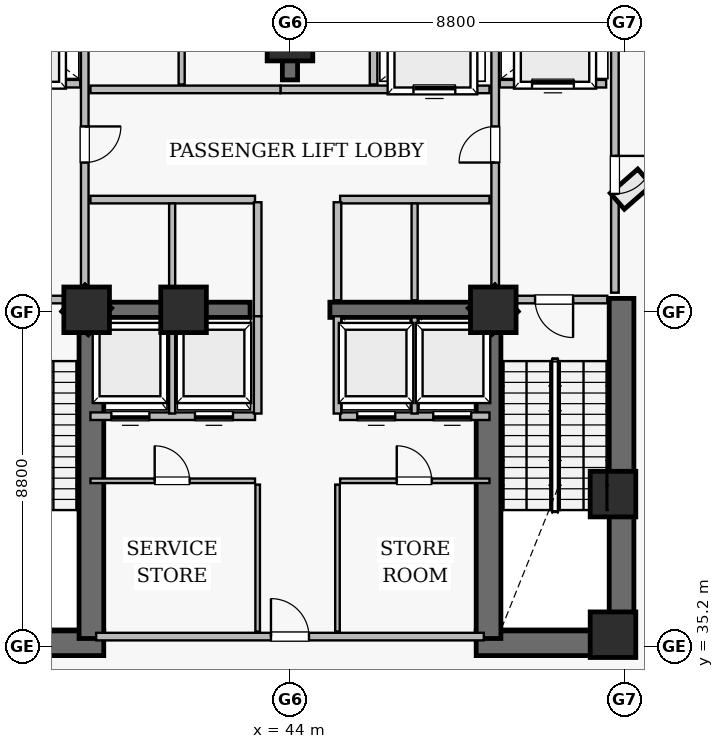
"""IFC4 building model, lengths in metres.
Left out: names, types, materials, properties, quantities, classifications, styles, units other than length and angle.
Written with IfcOpenShell. Run it as: python <this file> out.ifc"""

import sys

from ifc_helpers import new_model, si_unit, direction, frame, frame_2d, origin, origin_2d, place, context, subcontext, project, spatial, rectangle, extrude, element, fill, save


model = new_model("IFC4")
c1 = context("Model", 3, precision=1e-05, world=origin(), true_north=direction((0.0, 1.0)))
c2 = subcontext(c1, "Body", "Model", "MODEL_VIEW")
j1 = project(units=[si_unit("LENGTHUNIT", "METRE"), si_unit("PLANEANGLEUNIT", "RADIAN")], contexts=[c1])
p1 = place(None, origin())
s1 = spatial("IfcSite", under=j1, at=p1, CompositionType="ELEMENT")
p2 = place(p1, origin())
s2 = spatial("IfcBuilding", under=s1, at=p2, CompositionType="ELEMENT")
p3 = place(p2, frame((0.0, 0.0, 90.4)))
s3 = spatial("IfcBuildingStorey", under=s2, at=p3, CompositionType="ELEMENT", Elevation=90.4)
for number, where, z_axis, x_axis in (
    (1, (34.95, 35.275, 0.0), (0.0, 0.0, 1.0), (1.0, 0.0, 0.0)),
    (2, (48.9, 35.275, 0.0), (0.0, 0.0, 1.0), (1.0, 0.0, 0.0)),
):
    element("IfcWall", number, at=place(p3, frame(where, z_axis=z_axis, x_axis=x_axis)), inside=s3, PredefinedType="SHEAR", context=c2, shape_type="SweptSolid", body=[
        extrude(rectangle(XDim=4.15, YDim=0.65, at=frame_2d((2.075, 0.0))), origin(), (0.0, 0.0, 1.0), 5.1),
    ])
p4 = place(p3, frame((52.725, 34.95, 0.0), z_axis=(0.0, 0.0, 1.0), x_axis=(0.0, 1.0, 0.0)))
e3 = element("IfcWall", 3, at=p4, inside=s3, PredefinedType="SHEAR", context=c2, shape_type="SweptSolid", body=[
    extrude(rectangle(XDim=9.4, YDim=0.65, at=frame_2d((4.7, 0.0))), origin(), (0.0, 0.0, 1.0), 5.1),
])
for number, where, z_axis, x_axis in (
    (4, (38.775, 35.4, 0.0), (0.0, 0.0, 1.0), (0.0, 1.0, 0.0)),
    (5, (49.225, 35.4, 0.0), (0.0, 0.0, 1.0), (0.0, 1.0, 0.0)),
):
    element("IfcWall", number, at=place(p3, frame(where, z_axis=z_axis, x_axis=x_axis)), inside=s3, PredefinedType="SHEAR", context=c2, shape_type="SweptSolid", body=[
        extrude(rectangle(XDim=8.95, YDim=0.65, at=frame_2d((4.475, 0.0))), origin(), (0.0, 0.0, 1.0), 5.1),
    ])
p5 = place(p3, frame((44.0, 50.1, 0.0), z_axis=(0.0, 0.0, 1.0), x_axis=(0.0, 1.0, 0.0)))
e6 = element("IfcWall", 6, at=p5, inside=s3, PredefinedType="SHEAR", context=c2, shape_type="SweptSolid", body=[
    extrude(rectangle(XDim=2.1, YDim=0.4, at=frame_2d((1.05, 0.0))), origin(), (0.0, 0.0, 1.0), 5.1),
])
for number, where, z_axis, x_axis in (
    (7, (38.75, 44.05, 0.0), (0.0, 0.0, 1.0), (1.0, 0.0, 0.0)),
    (8, (45.05, 44.05, 0.0), (0.0, 0.0, 1.0), (1.0, 0.0, 0.0)),
):
    element("IfcWall", number, at=place(p3, frame(where, z_axis=z_axis, x_axis=x_axis)), inside=s3, PredefinedType="SHEAR", context=c2, shape_type="SweptSolid", body=[
        extrude(rectangle(XDim=4.2, YDim=0.4, at=frame_2d((2.1, 0.0))), origin(), (0.0, 0.0, 1.0), 5.1),
    ])
for number, where, z_axis, x_axis in (
    (9, (38.65, 44.05, 0.0), (0.0, 0.0, 1.0), (1.0, 0.0, 0.0)),
    (10, (52.5, 35.5, 0.0), (0.0, 0.0, 1.0), (1.0, 0.0, 0.0)),
    (11, (52.5, 39.2, 0.0), (0.0, 0.0, 1.0), (1.0, 0.0, 0.0)),
    (12, (49.35, 44.05, 0.0), (0.0, 0.0, 1.0), (1.0, 0.0, 0.0)),
    (13, (44.0, 51.2, 0.0), (0.0, 0.0, 1.0), (1.0, 0.0, 0.0)),
    (14, (41.2, 44.05, 0.0), (0.0, 0.0, 1.0), (1.0, 0.0, 0.0)),
):
    element("IfcColumn", number, at=place(p3, frame(where, z_axis=z_axis, x_axis=x_axis)), inside=s3, PredefinedType="COLUMN", context=c2, shape_type="SweptSolid", body=[
        extrude(rectangle(XDim=1.2, YDim=1.2, at=origin_2d()), origin(), (0.0, 0.0, 1.0), 5.4),
    ])
p6 = place(p3, frame((38.9, 35.45, 0.0), z_axis=(0.0, 0.0, 1.0), x_axis=(1.0, 0.0, 0.0)))
e15 = element("IfcWall", 15, at=p6, inside=s3, PredefinedType="SOLIDWALL", context=c2, shape_type="SweptSolid", body=[
    extrude(rectangle(XDim=10.2, YDim=0.2, at=frame_2d((5.1, 0.0))), origin(), (0.0, 0.0, 1.0), 5.1),
])
p7 = place(p6, frame((4.6, 0.0, 0.0)))
e16 = element("IfcOpeningElement", 16, at=p7, cuts=e15, PredefinedType="OPENING", context=c2, shape_type="SweptSolid", body=[
    extrude(rectangle(XDim=1.0, YDim=2.15, at=frame_2d((0.5, 1.075))), frame((0.0, 0.11, 0.0), z_axis=(0.0, -1.0, 0.0), x_axis=(1.0, 0.0, 0.0)), (0.0, 0.0, 1.0), 0.22),
])
p8 = place(p3, frame((52.55, 44.5, 0.0), z_axis=(0.0, 0.0, 1.0), x_axis=(0.0, 1.0, 0.0)))
e17 = element("IfcWall", 17, at=p8, inside=s3, PredefinedType="SOLIDWALL", context=c2, shape_type="SweptSolid", body=[
    extrude(rectangle(XDim=7.92, YDim=0.2, at=frame_2d((3.96, 0.0))), origin(), (0.0, 0.0, 1.0), 5.1),
])
p9 = place(p8, frame((2.6, 0.0, 0.0)))
e18 = element("IfcOpeningElement", 18, at=p9, cuts=e17, PredefinedType="OPENING", context=c2, shape_type="SweptSolid", body=[
    extrude(rectangle(XDim=1.0, YDim=2.15, at=frame_2d((0.5, 1.075))), frame((0.0, 0.11, 0.0), z_axis=(0.0, -1.0, 0.0), x_axis=(1.0, 0.0, 0.0)), (0.0, 0.0, 1.0), 0.22),
])
p10 = place(p3, frame((38.6, 44.5, 0.0), z_axis=(0.0, 0.0, 1.0), x_axis=(0.0, 1.0, 0.0)))
e19 = element("IfcWall", 19, at=p10, inside=s3, PredefinedType="SOLIDWALL", context=c2, shape_type="SweptSolid", body=[
    extrude(rectangle(XDim=7.92, YDim=0.2, at=frame_2d((3.96, 0.0))), origin(), (0.0, 0.0, 1.0), 5.1),
])
p11 = place(p10, frame((3.425, 0.0, 0.0)))
e20 = element("IfcOpeningElement", 20, at=p11, cuts=e19, PredefinedType="OPENING", context=c2, shape_type="SweptSolid", body=[
    extrude(rectangle(XDim=0.95, YDim=2.15, at=frame_2d((0.475, 1.075))), frame((0.0, 0.11, 0.0), z_axis=(0.0, -1.0, 0.0), x_axis=(1.0, 0.0, 0.0)), (0.0, 0.0, 1.0), 0.22),
])
p12 = place(p3, frame((49.4, 44.5, 0.0), z_axis=(0.0, 0.0, 1.0), x_axis=(0.0, 1.0, 0.0)))
e21 = element("IfcWall", 21, at=p12, inside=s3, PredefinedType="SOLIDWALL", context=c2, shape_type="SweptSolid", body=[
    extrude(rectangle(XDim=7.92, YDim=0.2, at=frame_2d((3.96, 0.0))), origin(), (0.0, 0.0, 1.0), 4.188),
])
p13 = place(p12, frame((3.425, 0.0, 0.0)))
e22 = element("IfcOpeningElement", 22, at=p13, cuts=e21, PredefinedType="OPENING", context=c2, shape_type="SweptSolid", body=[
    extrude(rectangle(XDim=0.95, YDim=2.15, at=frame_2d((0.475, 1.075))), frame((0.0, 0.11, 0.0), z_axis=(0.0, -1.0, 0.0), x_axis=(1.0, 0.0, 0.0)), (0.0, 0.0, 1.0), 0.22),
])
p14 = place(p3, frame((43.75, 49.85, 0.0), z_axis=(0.0, 0.0, 1.0), x_axis=(1.0, 0.0, 0.0)))
e23 = element("IfcWall", 23, at=p14, inside=s3, PredefinedType="SOLIDWALL", context=c2, shape_type="SweptSolid", body=[
    extrude(rectangle(XDim=5.5, YDim=0.2, at=frame_2d((2.75, 0.0))), origin(), (0.0, 0.0, 1.0), 4.188),
])
p15 = place(p14, frame((3.5, 0.0, 0.0)))
e24 = element("IfcOpeningElement", 24, at=p15, cuts=e23, PredefinedType="OPENING", context=c2, shape_type="SweptSolid", body=[
    extrude(rectangle(XDim=1.1, YDim=2.15, at=frame_2d((0.55, 1.075))), frame((0.0, 0.11, 0.0), z_axis=(0.0, -1.0, 0.0), x_axis=(1.0, 0.0, 0.0)), (0.0, 0.0, 1.0), 0.22),
])
p16 = place(p3, frame((38.75, 41.25, 0.0), z_axis=(0.0, 0.0, 1.0), x_axis=(1.0, 0.0, 0.0)))
e25 = element("IfcWall", 25, at=p16, inside=s3, PredefinedType="SOLIDWALL", context=c2, shape_type="SweptSolid", body=[
    extrude(rectangle(XDim=4.33, YDim=0.2, at=frame_2d((2.165, 0.0))), origin(), (0.0, 0.0, 1.0), 5.1),
])
p17 = place(p16, frame((0.55, 0.0, 0.0)))
e26 = element("IfcOpeningElement", 26, at=p17, cuts=e25, PredefinedType="OPENING", context=c2, shape_type="SweptSolid", body=[
    extrude(rectangle(XDim=1.0, YDim=2.15, at=frame_2d((0.5, 1.075))), frame((0.0, 0.11, 0.0), z_axis=(0.0, -1.0, 0.0), x_axis=(1.0, 0.0, 0.0)), (0.0, 0.0, 1.0), 0.22),
])
p18 = place(p16, frame((2.75, 0.0, 0.0)))
e27 = element("IfcOpeningElement", 27, at=p18, cuts=e25, PredefinedType="OPENING", context=c2, shape_type="SweptSolid", body=[
    extrude(rectangle(XDim=1.0, YDim=2.15, at=frame_2d((0.5, 1.075))), frame((0.0, 0.11, 0.0), z_axis=(0.0, -1.0, 0.0), x_axis=(1.0, 0.0, 0.0)), (0.0, 0.0, 1.0), 0.22),
])
p19 = place(p3, frame((38.75, 39.55, 0.0), z_axis=(0.0, 0.0, 1.0), x_axis=(1.0, 0.0, 0.0)))
e28 = element("IfcWall", 28, at=p19, inside=s3, PredefinedType="PARTITIONING", context=c2, shape_type="SweptSolid", body=[
    extrude(rectangle(XDim=4.33, YDim=0.12, at=frame_2d((2.165, 0.0))), origin(), (0.0, 0.0, 1.0), 5.1),
])
p20 = place(p19, frame((1.69, 0.0, 0.0)))
e29 = element("IfcOpeningElement", 29, at=p20, cuts=e28, PredefinedType="OPENING", context=c2, shape_type="SweptSolid", body=[
    extrude(rectangle(XDim=0.92, YDim=2.1, at=frame_2d((0.46, 1.05))), frame((0.0, 0.07, 0.0), z_axis=(0.0, -1.0, 0.0), x_axis=(1.0, 0.0, 0.0)), (0.0, 0.0, 1.0), 0.14),
])
p21 = place(p3, frame((45.32, 41.25, 0.0), z_axis=(0.0, 0.0, 1.0), x_axis=(1.0, 0.0, 0.0)))
e30 = element("IfcWall", 30, at=p21, inside=s3, PredefinedType="SOLIDWALL", context=c2, shape_type="SweptSolid", body=[
    extrude(rectangle(XDim=3.93, YDim=0.2, at=frame_2d((1.965, 0.0))), origin(), (0.0, 0.0, 1.0), 5.1),
])
p22 = place(p21, frame((0.45, 0.0, 0.0)))
e31 = element("IfcOpeningElement", 31, at=p22, cuts=e30, PredefinedType="OPENING", context=c2, shape_type="SweptSolid", body=[
    extrude(rectangle(XDim=1.0, YDim=2.15, at=frame_2d((0.5, 1.075))), frame((0.0, 0.11, 0.0), z_axis=(0.0, -1.0, 0.0), x_axis=(1.0, 0.0, 0.0)), (0.0, 0.0, 1.0), 0.22),
])
p23 = place(p21, frame((2.45, 0.0, 0.0)))
e32 = element("IfcOpeningElement", 32, at=p23, cuts=e30, PredefinedType="OPENING", context=c2, shape_type="SweptSolid", body=[
    extrude(rectangle(XDim=1.0, YDim=2.15, at=frame_2d((0.5, 1.075))), frame((0.0, 0.11, 0.0), z_axis=(0.0, -1.0, 0.0), x_axis=(1.0, 0.0, 0.0)), (0.0, 0.0, 1.0), 0.22),
])
p24 = place(p3, frame((45.32, 39.55, 0.0), z_axis=(0.0, 0.0, 1.0), x_axis=(1.0, 0.0, 0.0)))
e33 = element("IfcWall", 33, at=p24, inside=s3, PredefinedType="PARTITIONING", context=c2, shape_type="SweptSolid", body=[
    extrude(rectangle(XDim=3.93, YDim=0.12, at=frame_2d((1.965, 0.0))), origin(), (0.0, 0.0, 1.0), 5.1),
])
p25 = place(p24, frame((1.49, 0.0, 0.0)))
e34 = element("IfcOpeningElement", 34, at=p25, cuts=e33, PredefinedType="OPENING", context=c2, shape_type="SweptSolid", body=[
    extrude(rectangle(XDim=0.92, YDim=2.1, at=frame_2d((0.46, 1.05))), frame((0.0, 0.07, 0.0), z_axis=(0.0, -1.0, 0.0), x_axis=(1.0, 0.0, 0.0)), (0.0, 0.0, 1.0), 0.14),
])
p26 = place(p3, frame((35.65, 44.32, 0.0), z_axis=(0.0, 0.0, 1.0), x_axis=(1.0, 0.0, 0.0)))
e35 = element("IfcWall", 35, at=p26, inside=s3, PredefinedType="SOLIDWALL", context=c2, shape_type="SweptSolid", body=[
    extrude(rectangle(XDim=2.8, YDim=0.2, at=frame_2d((1.4, 0.0))), origin(), (0.0, 0.0, 1.0), 5.1),
])
p27 = place(p26, frame((0.9, 0.0, 0.0)))
e36 = element("IfcOpeningElement", 36, at=p27, cuts=e35, PredefinedType="OPENING", context=c2, shape_type="SweptSolid", body=[
    extrude(rectangle(XDim=1.0, YDim=2.15, at=frame_2d((0.5, 1.075))), frame((0.0, 0.11, 0.0), z_axis=(0.0, -1.0, 0.0), x_axis=(1.0, 0.0, 0.0)), (0.0, 0.0, 1.0), 0.22),
])
p28 = place(p3, frame((49.55, 44.32, 0.0), z_axis=(0.0, 0.0, 1.0), x_axis=(1.0, 0.0, 0.0)))
e37 = element("IfcWall", 37, at=p28, inside=s3, PredefinedType="SOLIDWALL", context=c2, shape_type="SweptSolid", body=[
    extrude(rectangle(XDim=2.8, YDim=0.2, at=frame_2d((1.4, 0.0))), origin(), (0.0, 0.0, 1.0), 4.188),
])
p29 = place(p28, frame((0.9, 0.0, 0.0)))
e38 = element("IfcOpeningElement", 38, at=p29, cuts=e37, PredefinedType="OPENING", context=c2, shape_type="SweptSolid", body=[
    extrude(rectangle(XDim=1.0, YDim=2.15, at=frame_2d((0.5, 1.075))), frame((0.0, 0.11, 0.0), z_axis=(0.0, -1.0, 0.0), x_axis=(1.0, 0.0, 0.0)), (0.0, 0.0, 1.0), 0.22),
])
p30 = place(p3, frame((35.68, 50.0, 0.0), z_axis=(0.0, 0.0, 1.0), x_axis=(1.0, 0.0, 0.0)))
e39 = element("IfcWall", 39, at=p30, inside=s3, PredefinedType="SOLIDWALL", context=c2, shape_type="SweptSolid", body=[
    extrude(rectangle(XDim=2.8, YDim=0.2, at=frame_2d((1.4, 0.0))), origin(), (0.0, 0.0, 1.0), 5.1),
])
p31 = place(p30, frame((0.85, 0.0, 0.0)))
e40 = element("IfcOpeningElement", 40, at=p31, cuts=e39, PredefinedType="OPENING", context=c2, shape_type="SweptSolid", body=[
    extrude(rectangle(XDim=1.1, YDim=2.15, at=frame_2d((0.55, 1.075))), frame((0.0, 0.11, 0.0), z_axis=(0.0, -1.0, 0.0), x_axis=(1.0, 0.0, 0.0)), (0.0, 0.0, 1.0), 0.22),
])
p32 = place(p3, frame((49.52, 50.0, 0.0), z_axis=(0.0, 0.0, 1.0), x_axis=(1.0, 0.0, 0.0)))
e41 = element("IfcWall", 41, at=p32, inside=s3, PredefinedType="SOLIDWALL", context=c2, shape_type="SweptSolid", body=[
    extrude(rectangle(XDim=2.8, YDim=0.2, at=frame_2d((1.4, 0.0))), origin(), (0.0, 0.0, 1.0), 5.1),
])
p33 = place(p32, frame((0.85, 0.0, 0.0)))
e42 = element("IfcOpeningElement", 42, at=p33, cuts=e41, PredefinedType="OPENING", context=c2, shape_type="SweptSolid", body=[
    extrude(rectangle(XDim=1.1, YDim=2.15, at=frame_2d((0.55, 1.075))), frame((0.0, 0.11, 0.0), z_axis=(0.0, -1.0, 0.0), x_axis=(1.0, 0.0, 0.0)), (0.0, 0.0, 1.0), 0.22),
])
p34 = place(p3, frame((38.75, 49.85, 0.0), z_axis=(0.0, 0.0, 1.0), x_axis=(1.0, 0.0, 0.0)))
e43 = element("IfcWall", 43, at=p34, inside=s3, PredefinedType="SOLIDWALL", context=c2, shape_type="SweptSolid", body=[
    extrude(rectangle(XDim=5.0, YDim=0.2, at=frame_2d((2.5, 0.0))), origin(), (0.0, 0.0, 1.0), 5.1),
])
p35 = place(p3, frame((38.75, 46.95, 0.0), z_axis=(0.0, 0.0, 1.0), x_axis=(1.0, 0.0, 0.0)))
e44 = element("IfcWall", 44, at=p35, inside=s3, PredefinedType="SOLIDWALL", context=c2, shape_type="SweptSolid", body=[
    extrude(rectangle(XDim=4.33, YDim=0.2, at=frame_2d((2.165, 0.0))), origin(), (0.0, 0.0, 1.0), 5.1),
])
p36 = place(p3, frame((45.32, 46.95, 0.0), z_axis=(0.0, 0.0, 1.0), x_axis=(1.0, 0.0, 0.0)))
e45 = element("IfcWall", 45, at=p36, inside=s3, PredefinedType="SOLIDWALL", context=c2, shape_type="SweptSolid", body=[
    extrude(rectangle(XDim=3.93, YDim=0.2, at=frame_2d((1.965, 0.0))), origin(), (0.0, 0.0, 1.0), 4.188),
])
for number, where, z_axis, x_axis in (
    (46, (43.15, 35.58, 0.0), (0.0, 0.0, 1.0), (0.0, 1.0, 0.0)),
    (47, (45.25, 35.58, 0.0), (0.0, 0.0, 1.0), (0.0, 1.0, 0.0)),
):
    element("IfcWall", number, at=place(p3, frame(where, z_axis=z_axis, x_axis=x_axis)), inside=s3, PredefinedType="PARTITIONING", context=c2, shape_type="SweptSolid", body=[
        extrude(rectangle(XDim=3.87, YDim=0.12, at=frame_2d((1.935, 0.0))), origin(), (0.0, 0.0, 1.0), 5.1),
    ])
p37 = place(p3, frame((43.15, 43.88, 0.0), z_axis=(0.0, 0.0, 1.0), x_axis=(0.0, 1.0, 0.0)))
e48 = element("IfcWall", 48, at=p37, inside=s3, PredefinedType="SOLIDWALL", context=c2, shape_type="SweptSolid", body=[
    extrude(rectangle(XDim=3.0, YDim=0.2, at=frame_2d((1.5, 0.0))), origin(), (0.0, 0.0, 1.0), 5.1),
])
p38 = place(p3, frame((45.25, 44.3, 0.0), z_axis=(0.0, 0.0, 1.0), x_axis=(0.0, 1.0, 0.0)))
e49 = element("IfcWall", 49, at=p38, inside=s3, PredefinedType="SOLIDWALL", context=c2, shape_type="SweptSolid", body=[
    extrude(rectangle(XDim=2.58, YDim=0.2, at=frame_2d((1.29, 0.0))), origin(), (0.0, 0.0, 1.0), 5.1),
])
for number, where, z_axis, x_axis in (
    (50, (43.15, 41.32, 0.0), (0.0, 0.0, 1.0), (0.0, 1.0, 0.0)),
    (51, (45.25, 41.32, 0.0), (0.0, 0.0, 1.0), (0.0, 1.0, 0.0)),
):
    element("IfcWall", number, at=place(p3, frame(where, z_axis=z_axis, x_axis=x_axis)), inside=s3, PredefinedType="SOLIDWALL", context=c2, shape_type="SweptSolid", body=[
        extrude(rectangle(XDim=2.56, YDim=0.2, at=frame_2d((1.28, 0.0))), origin(), (0.0, 0.0, 1.0), 5.1),
    ])
p39 = place(p3, frame((40.9, 44.3, 0.0), z_axis=(0.0, 0.0, 1.0), x_axis=(0.0, 1.0, 0.0)))
e52 = element("IfcWall", 52, at=p39, inside=s3, PredefinedType="SOLIDWALL", context=c2, shape_type="SweptSolid", body=[
    extrude(rectangle(XDim=2.55, YDim=0.16, at=frame_2d((1.275, 0.0))), origin(), (0.0, 0.0, 1.0), 5.1),
])
p40 = place(p3, frame((47.28, 44.3, 0.0), z_axis=(0.0, 0.0, 1.0), x_axis=(0.0, 1.0, 0.0)))
e53 = element("IfcWall", 53, at=p40, inside=s3, PredefinedType="SOLIDWALL", context=c2, shape_type="SweptSolid", body=[
    extrude(rectangle(XDim=2.55, YDim=0.16, at=frame_2d((1.275, 0.0))), origin(), (0.0, 0.0, 1.0), 4.188),
])
for number, where, z_axis, x_axis in (
    (54, (40.9, 41.32, 0.0), (0.0, 0.0, 1.0), (0.0, 1.0, 0.0)),
    (55, (47.28, 41.32, 0.0), (0.0, 0.0, 1.0), (0.0, 1.0, 0.0)),
):
    element("IfcWall", number, at=place(p3, frame(where, z_axis=z_axis, x_axis=x_axis)), inside=s3, PredefinedType="SOLIDWALL", context=c2, shape_type="SweptSolid", body=[
        extrude(rectangle(XDim=2.53, YDim=0.16, at=frame_2d((1.265, 0.0))), origin(), (0.0, 0.0, 1.0), 5.1),
    ])
p41 = place(p3, frame((41.15, 49.98, 0.0), z_axis=(0.0, 0.0, 1.0), x_axis=(0.0, 1.0, 0.0)))
e56 = element("IfcWall", 56, at=p41, inside=s3, PredefinedType="SOLIDWALL", context=c2, shape_type="SweptSolid", body=[
    extrude(rectangle(XDim=2.37, YDim=0.16, at=frame_2d((1.185, 0.0))), origin(), (0.0, 0.0, 1.0), 5.1),
])
p42 = place(p3, frame((46.2, 49.98, 0.0), z_axis=(0.0, 0.0, 1.0), x_axis=(0.0, 1.0, 0.0)))
e57 = element("IfcWall", 57, at=p42, inside=s3, PredefinedType="SOLIDWALL", context=c2, shape_type="SweptSolid", body=[
    extrude(rectangle(XDim=2.37, YDim=0.2, at=frame_2d((1.185, 0.0))), origin(), (0.0, 0.0, 1.0), 5.1),
])
p43 = place(p29, frame((1.0, 0.0, 0.0), z_axis=(0.0, 0.0, 1.0), x_axis=(-1.0, 0.0, 0.0)))
e58 = element("IfcDoor", 58, at=p43, inside=s3, OperationType="SINGLE_SWING_RIGHT", PredefinedType="DOOR", context=c2, shape_type="SweptSolid", body=[
    extrude(rectangle(XDim=1.0, YDim=2.15, at=frame_2d((0.5, 1.075))), frame((0.0, 0.025, 0.0), z_axis=(0.0, -1.0, 0.0), x_axis=(1.0, 0.0, 0.0)), (0.0, 0.0, 1.0), 0.05),
])
fill(e38, e58)
p44 = place(p9, frame((1.0, 0.0, 0.0), z_axis=(0.0, 0.0, 1.0), x_axis=(-1.0, 0.0, 0.0)))
e59 = element("IfcDoor", 59, at=p44, inside=s3, OperationType="SINGLE_SWING_RIGHT", PredefinedType="DOOR", context=c2, shape_type="SweptSolid", body=[
    extrude(rectangle(XDim=1.0, YDim=2.15, at=frame_2d((0.5, 1.075))), frame((0.0, 0.025, 0.0), z_axis=(0.0, -1.0, 0.0), x_axis=(1.0, 0.0, 0.0)), (0.0, 0.0, 1.0), 0.05),
])
fill(e18, e59)
p45 = place(p11, frame((0.95, 0.0, 0.0), z_axis=(0.0, 0.0, 1.0), x_axis=(-1.0, 0.0, 0.0)))
e60 = element("IfcDoor", 60, at=p45, inside=s3, OperationType="SINGLE_SWING_RIGHT", PredefinedType="DOOR", context=c2, shape_type="SweptSolid", body=[
    extrude(rectangle(XDim=0.95, YDim=2.15, at=frame_2d((0.475, 1.075))), frame((0.0, 0.025, 0.0), z_axis=(0.0, -1.0, 0.0), x_axis=(1.0, 0.0, 0.0)), (0.0, 0.0, 1.0), 0.05),
])
fill(e20, e60)
p46 = place(p13, origin())
e61 = element("IfcDoor", 61, at=p46, inside=s3, OperationType="SINGLE_SWING_LEFT", PredefinedType="DOOR", context=c2, shape_type="SweptSolid", body=[
    extrude(rectangle(XDim=0.95, YDim=2.15, at=frame_2d((0.475, 1.075))), frame((0.0, 0.025, 0.0), z_axis=(0.0, -1.0, 0.0), x_axis=(1.0, 0.0, 0.0)), (0.0, 0.0, 1.0), 0.05),
])
fill(e22, e61)
p47 = place(p33, origin())
e62 = element("IfcDoor", 62, at=p47, inside=s3, OperationType="SLIDING_TO_LEFT", PredefinedType="DOOR", context=c2, shape_type="SweptSolid", body=[
    extrude(rectangle(XDim=1.1, YDim=2.15, at=frame_2d((0.55, 1.075))), frame((0.0, 0.025, 0.0), z_axis=(0.0, -1.0, 0.0), x_axis=(1.0, 0.0, 0.0)), (0.0, 0.0, 1.0), 0.05),
])
fill(e42, e62)
p48 = place(p7, origin())
e63 = element("IfcDoor", 63, at=p48, inside=s3, OperationType="SINGLE_SWING_LEFT", PredefinedType="DOOR", context=c2, shape_type="SweptSolid", body=[
    extrude(rectangle(XDim=1.0, YDim=2.15, at=frame_2d((0.5, 1.075))), frame((0.0, 0.025, 0.0), z_axis=(0.0, -1.0, 0.0), x_axis=(1.0, 0.0, 0.0)), (0.0, 0.0, 1.0), 0.05),
])
fill(e16, e63)
p49 = place(p15, origin())
e64 = element("IfcDoor", 64, at=p49, inside=s3, OperationType="SLIDING_TO_LEFT", PredefinedType="DOOR", context=c2, shape_type="SweptSolid", body=[
    extrude(rectangle(XDim=1.1, YDim=2.15, at=frame_2d((0.55, 1.075))), frame((0.0, 0.025, 0.0), z_axis=(0.0, -1.0, 0.0), x_axis=(1.0, 0.0, 0.0)), (0.0, 0.0, 1.0), 0.05),
])
fill(e24, e64)
p50 = place(p17, frame((1.0, 0.0, 0.0), z_axis=(0.0, 0.0, 1.0), x_axis=(-1.0, 0.0, 0.0)))
e65 = element("IfcDoor", 65, at=p50, inside=s3, OperationType="SLIDING_TO_LEFT", PredefinedType="DOOR", context=c2, shape_type="SweptSolid", body=[
    extrude(rectangle(XDim=1.0, YDim=2.15, at=frame_2d((0.5, 1.075))), frame((0.0, 0.025, 0.0), z_axis=(0.0, -1.0, 0.0), x_axis=(1.0, 0.0, 0.0)), (0.0, 0.0, 1.0), 0.05),
])
fill(e26, e65)
p51 = place(p18, frame((1.0, 0.0, 0.0), z_axis=(0.0, 0.0, 1.0), x_axis=(-1.0, 0.0, 0.0)))
e66 = element("IfcDoor", 66, at=p51, inside=s3, OperationType="SLIDING_TO_LEFT", PredefinedType="DOOR", context=c2, shape_type="SweptSolid", body=[
    extrude(rectangle(XDim=1.0, YDim=2.15, at=frame_2d((0.5, 1.075))), frame((0.0, 0.025, 0.0), z_axis=(0.0, -1.0, 0.0), x_axis=(1.0, 0.0, 0.0)), (0.0, 0.0, 1.0), 0.05),
])
fill(e27, e66)
p52 = place(p22, frame((1.0, 0.0, 0.0), z_axis=(0.0, 0.0, 1.0), x_axis=(-1.0, 0.0, 0.0)))
e67 = element("IfcDoor", 67, at=p52, inside=s3, OperationType="SLIDING_TO_LEFT", PredefinedType="DOOR", context=c2, shape_type="SweptSolid", body=[
    extrude(rectangle(XDim=1.0, YDim=2.15, at=frame_2d((0.5, 1.075))), frame((0.0, 0.025, 0.0), z_axis=(0.0, -1.0, 0.0), x_axis=(1.0, 0.0, 0.0)), (0.0, 0.0, 1.0), 0.05),
])
fill(e31, e67)
p53 = place(p23, frame((1.0, 0.0, 0.0), z_axis=(0.0, 0.0, 1.0), x_axis=(-1.0, 0.0, 0.0)))
e68 = element("IfcDoor", 68, at=p53, inside=s3, OperationType="SLIDING_TO_LEFT", PredefinedType="DOOR", context=c2, shape_type="SweptSolid", body=[
    extrude(rectangle(XDim=1.0, YDim=2.15, at=frame_2d((0.5, 1.075))), frame((0.0, 0.025, 0.0), z_axis=(0.0, -1.0, 0.0), x_axis=(1.0, 0.0, 0.0)), (0.0, 0.0, 1.0), 0.05),
])
fill(e32, e68)
p54 = place(p20, origin())
e69 = element("IfcDoor", 69, at=p54, inside=s3, OperationType="SINGLE_SWING_LEFT", PredefinedType="DOOR", context=c2, shape_type="SweptSolid", body=[
    extrude(rectangle(XDim=0.92, YDim=2.1, at=frame_2d((0.46, 1.05))), frame((0.0, 0.025, 0.0), z_axis=(0.0, -1.0, 0.0), x_axis=(1.0, 0.0, 0.0)), (0.0, 0.0, 1.0), 0.05),
])
fill(e29, e69)
p55 = place(p25, origin())
e70 = element("IfcDoor", 70, at=p55, inside=s3, OperationType="SINGLE_SWING_LEFT", PredefinedType="DOOR", context=c2, shape_type="SweptSolid", body=[
    extrude(rectangle(XDim=0.92, YDim=2.1, at=frame_2d((0.46, 1.05))), frame((0.0, 0.025, 0.0), z_axis=(0.0, -1.0, 0.0), x_axis=(1.0, 0.0, 0.0)), (0.0, 0.0, 1.0), 0.05),
])
fill(e34, e70)
save(model, sys.argv[1])
